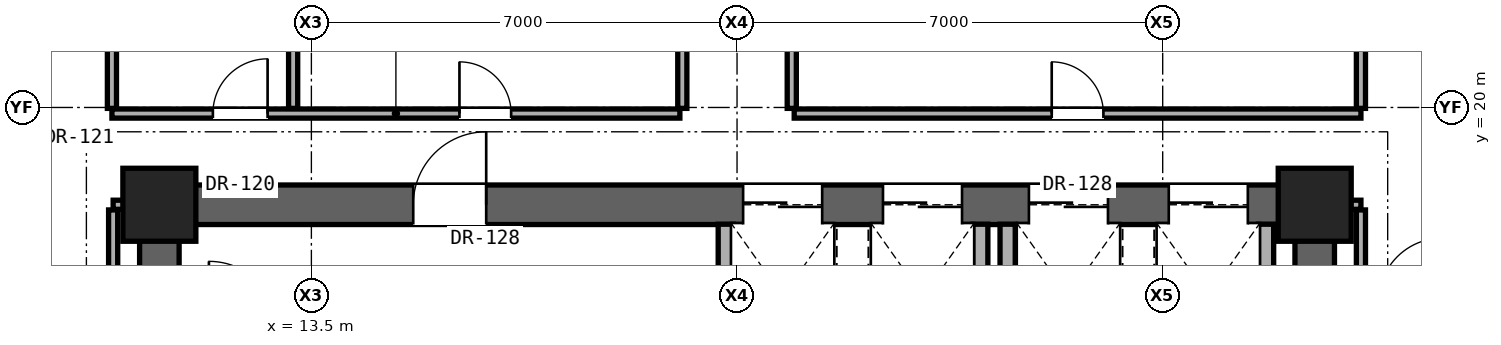
"""IFC4 building model, lengths in metres.
Left out: names, types, materials, properties, quantities, classifications, styles, units other than length and angle.
Written with IfcOpenShell. Run it as: python <this file> out.ifc"""

import sys

from ifc_helpers import new_model, si_unit, direction, frame, frame_2d, origin, origin_2d, place, context, subcontext, project, spatial, rectangle, extrude, element, fill, save


model = new_model("IFC4")
c1 = context("Model", 3, precision=1e-05, world=origin(), true_north=direction((0.0, 1.0)))
c2 = subcontext(c1, "Body", "Model", "MODEL_VIEW")
j1 = project(units=[si_unit("LENGTHUNIT", "METRE"), si_unit("PLANEANGLEUNIT", "RADIAN")], contexts=[c1])
p1 = place(None, origin())
s1 = spatial("IfcSite", under=j1, at=p1, CompositionType="ELEMENT")
p2 = place(p1, origin())
s2 = spatial("IfcBuilding", under=s1, at=p2, CompositionType="ELEMENT")
p3 = place(p2, frame((0.0, 0.0, 108.2)))
s3 = spatial("IfcBuildingStorey", under=s2, at=p3, CompositionType="ELEMENT", Elevation=108.2)
for number, where, z_axis, x_axis in (
    (1, (11.0, 18.4, 0.0), (0.0, 0.0, 1.0), (1.0, 0.0, 0.0)),
    (2, (30.0, 18.4, 0.0), (0.0, 0.0, 1.0), (1.0, 0.0, 0.0)),
):
    element("IfcColumn", number, at=place(p3, frame(where, z_axis=z_axis, x_axis=x_axis)), inside=s3, PredefinedType="COLUMN", context=c2, shape_type="SweptSolid", body=[
        extrude(rectangle(XDim=1.2, YDim=1.2, at=origin_2d()), origin(), (0.0, 0.0, 1.0), 3.3),
    ])
for number, where, z_axis, x_axis in (
    (3, (11.0, 12.4, 0.0), (0.0, 0.0, 1.0), (0.0, 1.0, 0.0)),
    (4, (30.0, 12.4, 0.0), (0.0, 0.0, 1.0), (0.0, 1.0, 0.0)),
):
    element("IfcWall", number, at=place(p3, frame(where, z_axis=z_axis, x_axis=x_axis)), inside=s3, PredefinedType="SHEAR", context=c2, shape_type="SweptSolid", body=[
        extrude(rectangle(XDim=6.0, YDim=0.65, at=frame_2d((3.0, 0.0))), origin(), (0.0, 0.0, 1.0), 3.08),
    ])
p4 = place(p3, frame((11.0, 18.4, 0.0), z_axis=(0.0, 0.0, 1.0), x_axis=(1.0, 0.0, 0.0)))
e5 = element("IfcWall", 5, at=p4, inside=s3, PredefinedType="SHEAR", context=c2, shape_type="SweptSolid", body=[
    extrude(rectangle(XDim=19.0, YDim=0.65, at=frame_2d((9.5, 0.0))), origin(), (0.0, 0.0, 1.0), 3.08),
])
p5 = place(p4, frame((4.175, 0.0, 0.0)))
e6 = element("IfcOpeningElement", 6, at=p5, cuts=e5, PredefinedType="OPENING", context=c2, shape_type="SweptSolid", body=[
    extrude(rectangle(XDim=1.2, YDim=2.25, at=frame_2d((0.6, 1.125))), frame((0.0, 0.335, 0.0), z_axis=(0.0, -1.0, 0.0), x_axis=(1.0, 0.0, 0.0)), (0.0, 0.0, 1.0), 0.67),
])
p6 = place(p4, frame((9.6, 0.0, 0.0)))
e7 = element("IfcOpeningElement", 7, at=p6, cuts=e5, PredefinedType="OPENING", context=c2, shape_type="SweptSolid", body=[
    extrude(rectangle(XDim=1.3, YDim=2.3, at=frame_2d((0.65, 1.15))), frame((0.0, 0.335, 0.0), z_axis=(0.0, -1.0, 0.0), x_axis=(1.0, 0.0, 0.0)), (0.0, 0.0, 1.0), 0.67),
])
p7 = place(p4, frame((11.9, 0.0, 0.0)))
e8 = element("IfcOpeningElement", 8, at=p7, cuts=e5, PredefinedType="OPENING", context=c2, shape_type="SweptSolid", body=[
    extrude(rectangle(XDim=1.3, YDim=2.3, at=frame_2d((0.65, 1.15))), frame((0.0, 0.335, 0.0), z_axis=(0.0, -1.0, 0.0), x_axis=(1.0, 0.0, 0.0)), (0.0, 0.0, 1.0), 0.67),
])
p8 = place(p4, frame((14.3, 0.0, 0.0)))
e9 = element("IfcOpeningElement", 9, at=p8, cuts=e5, PredefinedType="OPENING", context=c2, shape_type="SweptSolid", body=[
    extrude(rectangle(XDim=1.3, YDim=2.3, at=frame_2d((0.65, 1.15))), frame((0.0, 0.335, 0.0), z_axis=(0.0, -1.0, 0.0), x_axis=(1.0, 0.0, 0.0)), (0.0, 0.0, 1.0), 0.67),
])
p9 = place(p4, frame((16.6, 0.0, 0.0)))
e10 = element("IfcOpeningElement", 10, at=p9, cuts=e5, PredefinedType="OPENING", context=c2, shape_type="SweptSolid", body=[
    extrude(rectangle(XDim=1.3, YDim=2.3, at=frame_2d((0.65, 1.15))), frame((0.0, 0.335, 0.0), z_axis=(0.0, -1.0, 0.0), x_axis=(1.0, 0.0, 0.0)), (0.0, 0.0, 1.0), 0.67),
])
for number, where, z_axis, x_axis in (
    (11, (10.24, 18.4, 0.0), (0.0, 0.0, 1.0), (1.0, 0.0, 0.0)),
    (12, (30.32, 18.4, 0.0), (0.0, 0.0, 1.0), (1.0, 0.0, 0.0)),
):
    element("IfcWall", number, at=place(p3, frame(where, z_axis=z_axis, x_axis=x_axis)), inside=s3, PredefinedType="PARTITIONING", context=c2, shape_type="SweptSolid", body=[
        extrude(rectangle(XDim=0.44, YDim=0.15, at=frame_2d((0.22, 0.0))), origin(), (0.0, 0.0, 1.0), 2.456),
    ])
p10 = place(p3, frame((10.22, 19.9, 0.0), z_axis=(0.0, 0.0, 1.0), x_axis=(1.0, 0.0, 0.0)))
e13 = element("IfcWall", 13, at=p10, inside=s3, PredefinedType="PARTITIONING", context=c2, shape_type="SweptSolid", body=[
    extrude(rectangle(XDim=9.34, YDim=0.15, at=frame_2d((4.67, 0.0))), origin(), (0.0, 0.0, 1.0), 2.124),
])
p11 = place(p10, frame((1.66, 0.0, 0.0)))
e14 = element("IfcOpeningElement", 14, at=p11, cuts=e13, PredefinedType="OPENING", context=c2, shape_type="SweptSolid", body=[
    extrude(rectangle(XDim=0.9, YDim=2.1, at=frame_2d((0.45, 1.05))), frame((0.0, 0.085, 0.0), z_axis=(0.0, -1.0, 0.0), x_axis=(1.0, 0.0, 0.0)), (0.0, 0.0, 1.0), 0.17),
])
p12 = place(p10, frame((5.715, 0.0, 0.0)))
e15 = element("IfcOpeningElement", 15, at=p12, cuts=e13, PredefinedType="OPENING", context=c2, shape_type="SweptSolid", body=[
    extrude(rectangle(XDim=0.85, YDim=2.01, at=frame_2d((0.425, 1.005))), frame((0.0, 0.085, 0.0), z_axis=(0.0, -1.0, 0.0), x_axis=(1.0, 0.0, 0.0)), (0.0, 0.0, 1.0), 0.17),
])
p13 = place(p3, frame((21.44, 19.9, 0.0), z_axis=(0.0, 0.0, 1.0), x_axis=(1.0, 0.0, 0.0)))
e16 = element("IfcWall", 16, at=p13, inside=s3, PredefinedType="PARTITIONING", context=c2, shape_type="SweptSolid", body=[
    extrude(rectangle(XDim=9.32, YDim=0.15, at=frame_2d((4.66, 0.0))), origin(), (0.0, 0.0, 1.0), 2.124),
])
p14 = place(p13, frame((4.235, 0.0, 0.0)))
e17 = element("IfcOpeningElement", 17, at=p14, cuts=e16, PredefinedType="OPENING", context=c2, shape_type="SweptSolid", body=[
    extrude(rectangle(XDim=0.85, YDim=2.01, at=frame_2d((0.425, 1.005))), frame((0.0, 0.085, 0.0), z_axis=(0.0, -1.0, 0.0), x_axis=(1.0, 0.0, 0.0)), (0.0, 0.0, 1.0), 0.17),
])
p15 = place(p3, frame((10.22, 19.985, 0.0), z_axis=(0.0, 0.0, 1.0), x_axis=(0.0, 1.0, 0.0)))
e18 = element("IfcWall", 18, at=p15, inside=s3, PredefinedType="PARTITIONING", context=c2, shape_type="SweptSolid", body=[
    extrude(rectangle(XDim=2.78, YDim=0.15, at=frame_2d((1.39, 0.0))), origin(), (0.0, 0.0, 1.0), 3.08),
])
p16 = place(p3, frame((10.24, 12.335, 0.0), z_axis=(0.0, 0.0, 1.0), x_axis=(0.0, 1.0, 0.0)))
e19 = element("IfcWall", 19, at=p16, inside=s3, PredefinedType="PARTITIONING", context=c2, shape_type="SweptSolid", body=[
    extrude(rectangle(XDim=5.98, YDim=0.15, at=frame_2d((2.99, 0.0))), origin(), (0.0, 0.0, 1.0), 2.456),
])
p17 = place(p3, frame((13.2, 19.985, 0.0), z_axis=(0.0, 0.0, 1.0), x_axis=(0.0, 1.0, 0.0)))
e20 = element("IfcWall", 20, at=p17, inside=s3, PredefinedType="PARTITIONING", context=c2, shape_type="SweptSolid", body=[
    extrude(rectangle(XDim=2.78, YDim=0.15, at=frame_2d((1.39, 0.0))), origin(), (0.0, 0.0, 1.0), 3.08),
])
p18 = place(p3, frame((19.6, 19.985, 0.0), z_axis=(0.0, 0.0, 1.0), x_axis=(0.0, 1.0, 0.0)))
e21 = element("IfcWall", 21, at=p18, inside=s3, PredefinedType="PARTITIONING", context=c2, shape_type="SweptSolid", body=[
    extrude(rectangle(XDim=5.53, YDim=0.15, at=frame_2d((2.765, 0.0))), origin(), (0.0, 0.0, 1.0), 2.124),
])
p19 = place(p3, frame((20.315, 16.555, 0.0), z_axis=(0.0, 0.0, 1.0), x_axis=(0.0, 1.0, 0.0)))
e22 = element("IfcWall", 22, at=p19, inside=s3, PredefinedType="SOLIDWALL", context=c2, shape_type="SweptSolid", body=[
    extrude(rectangle(XDim=1.525, YDim=0.25, at=frame_2d((0.763, 0.0))), origin(), (0.0, 0.0, 1.0), 3.08),
])
p20 = place(p3, frame((21.4, 19.985, 0.0), z_axis=(0.0, 0.0, 1.0), x_axis=(0.0, 1.0, 0.0)))
e23 = element("IfcWall", 23, at=p20, inside=s3, PredefinedType="PARTITIONING", context=c2, shape_type="SweptSolid", body=[
    extrude(rectangle(XDim=5.53, YDim=0.15, at=frame_2d((2.765, 0.0))), origin(), (0.0, 0.0, 1.0), 2.124),
])
for number, where, z_axis, x_axis in (
    (24, (24.5, 15.785, 0.0), (0.0, 0.0, 1.0), (0.0, 1.0, 0.0)),
    (25, (24.95, 15.785, 0.0), (0.0, 0.0, 1.0), (0.0, 1.0, 0.0)),
    (26, (29.2, 15.785, 0.0), (0.0, 0.0, 1.0), (0.0, 1.0, 0.0)),
):
    element("IfcWall", number, at=place(p3, frame(where, z_axis=z_axis, x_axis=x_axis)), inside=s3, PredefinedType="SOLIDWALL", context=c2, shape_type="SweptSolid", body=[
        extrude(rectangle(XDim=2.295, YDim=0.25, at=frame_2d((1.147, 0.0))), origin(), (0.0, 0.0, 1.0), 3.08),
    ])
p21 = place(p3, frame((30.76, 12.335, 0.0), z_axis=(0.0, 0.0, 1.0), x_axis=(0.0, 1.0, 0.0)))
e27 = element("IfcWall", 27, at=p21, inside=s3, PredefinedType="PARTITIONING", context=c2, shape_type="SweptSolid", body=[
    extrude(rectangle(XDim=5.98, YDim=0.15, at=frame_2d((2.99, 0.0))), origin(), (0.0, 0.0, 1.0), 2.456),
])
p22 = place(p3, frame((30.76, 19.985, 0.0), z_axis=(0.0, 0.0, 1.0), x_axis=(0.0, 1.0, 0.0)))
e28 = element("IfcWall", 28, at=p22, inside=s3, PredefinedType="PARTITIONING", context=c2, shape_type="SweptSolid", body=[
    extrude(rectangle(XDim=5.53, YDim=0.15, at=frame_2d((2.765, 0.0))), origin(), (0.0, 0.0, 1.0), 2.299),
])
p23 = place(p5, origin())
e29 = element("IfcDoor", 29, at=p23, inside=s3, OperationType="SINGLE_SWING_RIGHT", PredefinedType="DOOR", context=c2, shape_type="SweptSolid", body=[
    extrude(rectangle(XDim=1.2, YDim=2.25, at=frame_2d((0.6, 1.125))), frame((0.0, 0.025, 0.0), z_axis=(0.0, -1.0, 0.0), x_axis=(1.0, 0.0, 0.0)), (0.0, 0.0, 1.0), 0.05),
])
fill(e6, e29)
p24 = place(p11, origin())
e30 = element("IfcDoor", 30, at=p24, inside=s3, OperationType="SINGLE_SWING_RIGHT", PredefinedType="DOOR", context=c2, shape_type="SweptSolid", body=[
    extrude(rectangle(XDim=0.9, YDim=2.1, at=frame_2d((0.45, 1.05))), frame((0.0, 0.025, 0.0), z_axis=(0.0, -1.0, 0.0), x_axis=(1.0, 0.0, 0.0)), (0.0, 0.0, 1.0), 0.05),
])
fill(e14, e30)
p25 = place(p12, origin())
e31 = element("IfcDoor", 31, at=p25, inside=s3, OperationType="SINGLE_SWING_LEFT", PredefinedType="DOOR", context=c2, shape_type="SweptSolid", body=[
    extrude(rectangle(XDim=0.85, YDim=2.01, at=frame_2d((0.425, 1.005))), frame((0.0, 0.025, 0.0), z_axis=(0.0, -1.0, 0.0), x_axis=(1.0, 0.0, 0.0)), (0.0, 0.0, 1.0), 0.05),
])
fill(e15, e31)
p26 = place(p14, origin())
e32 = element("IfcDoor", 32, at=p26, inside=s3, OperationType="SINGLE_SWING_LEFT", PredefinedType="DOOR", context=c2, shape_type="SweptSolid", body=[
    extrude(rectangle(XDim=0.85, YDim=2.01, at=frame_2d((0.425, 1.005))), frame((0.0, 0.025, 0.0), z_axis=(0.0, -1.0, 0.0), x_axis=(1.0, 0.0, 0.0)), (0.0, 0.0, 1.0), 0.05),
])
fill(e17, e32)
p27 = place(p6, origin())
e33 = element("IfcDoor", 33, at=p27, inside=s3, OperationType="DOUBLE_DOOR_SLIDING", PredefinedType="DOOR", context=c2, shape_type="SweptSolid", body=[
    extrude(rectangle(XDim=1.3, YDim=2.3, at=frame_2d((0.65, 1.15))), frame((0.0, 0.025, 0.0), z_axis=(0.0, -1.0, 0.0), x_axis=(1.0, 0.0, 0.0)), (0.0, 0.0, 1.0), 0.05),
])
fill(e7, e33)
p28 = place(p7, origin())
e34 = element("IfcDoor", 34, at=p28, inside=s3, OperationType="DOUBLE_DOOR_SLIDING", PredefinedType="DOOR", context=c2, shape_type="SweptSolid", body=[
    extrude(rectangle(XDim=1.3, YDim=2.3, at=frame_2d((0.65, 1.15))), frame((0.0, 0.025, 0.0), z_axis=(0.0, -1.0, 0.0), x_axis=(1.0, 0.0, 0.0)), (0.0, 0.0, 1.0), 0.05),
])
fill(e8, e34)
p29 = place(p8, origin())
e35 = element("IfcDoor", 35, at=p29, inside=s3, OperationType="DOUBLE_DOOR_SLIDING", PredefinedType="DOOR", context=c2, shape_type="SweptSolid", body=[
    extrude(rectangle(XDim=1.3, YDim=2.3, at=frame_2d((0.65, 1.15))), frame((0.0, 0.025, 0.0), z_axis=(0.0, -1.0, 0.0), x_axis=(1.0, 0.0, 0.0)), (0.0, 0.0, 1.0), 0.05),
])
fill(e9, e35)
p30 = place(p9, origin())
e36 = element("IfcDoor", 36, at=p30, inside=s3, OperationType="DOUBLE_DOOR_SLIDING", PredefinedType="DOOR", context=c2, shape_type="SweptSolid", body=[
    extrude(rectangle(XDim=1.3, YDim=2.3, at=frame_2d((0.65, 1.15))), frame((0.0, 0.025, 0.0), z_axis=(0.0, -1.0, 0.0), x_axis=(1.0, 0.0, 0.0)), (0.0, 0.0, 1.0), 0.05),
])
fill(e10, e36)
save(model, sys.argv[1])
